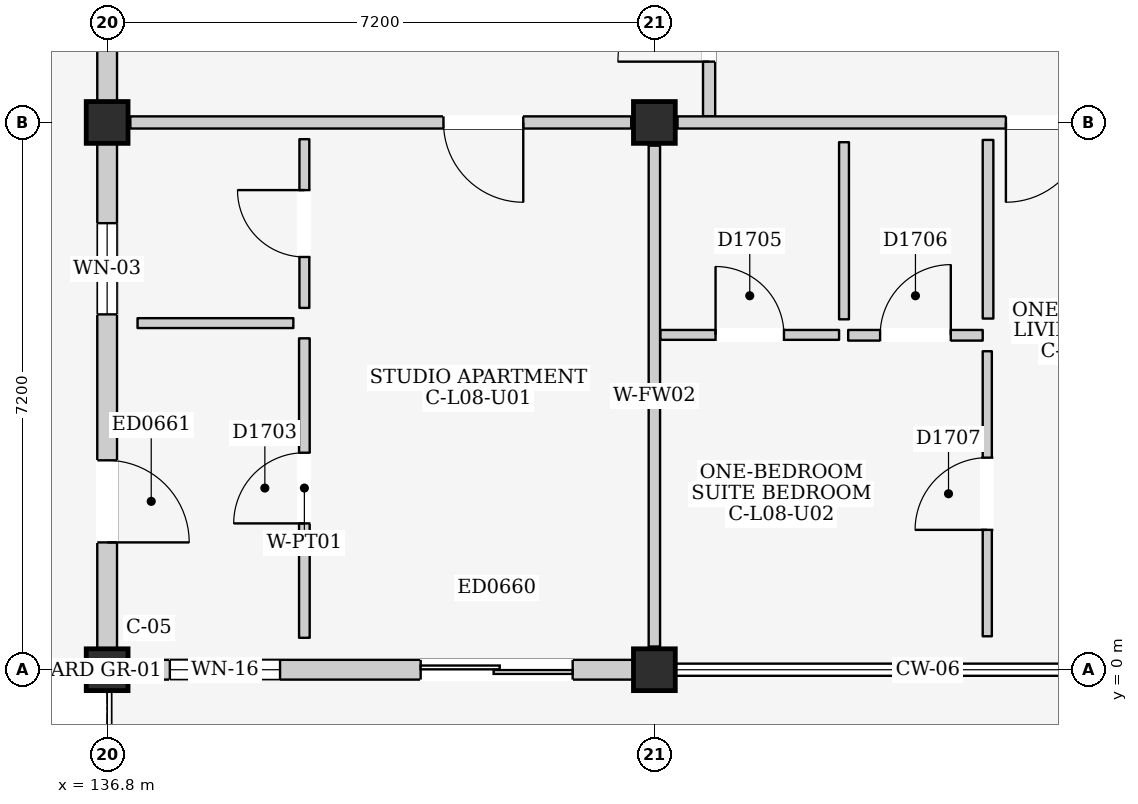
"""IFC4 building model, lengths in metres.
Left out: names, types, materials, properties, quantities, classifications, styles, units other than length and angle.
Written with IfcOpenShell. Run it as: python <this file> out.ifc"""

import sys

from ifc_helpers import new_model, si_unit, direction, frame, frame_2d, origin, origin_2d, place, context, subcontext, project, spatial, rectangle, extrude, element, fill, save


model = new_model("IFC4")
c1 = context("Model", 3, precision=1e-05, world=origin(), true_north=direction((0.0, 1.0)))
c2 = subcontext(c1, "Body", "Model", "MODEL_VIEW")
j1 = project(units=[si_unit("LENGTHUNIT", "METRE"), si_unit("PLANEANGLEUNIT", "RADIAN")], contexts=[c1])
p1 = place(None, origin())
s1 = spatial("IfcSite", under=j1, at=p1, CompositionType="ELEMENT")
p2 = place(p1, origin())
s2 = spatial("IfcBuilding", under=s1, at=p2, CompositionType="ELEMENT")
p3 = place(p2, frame((0.0, 0.0, 28.3)))
s3 = spatial("IfcBuildingStorey", under=s2, at=p3, CompositionType="ELEMENT", Elevation=28.3)
for number, where, z_axis, x_axis in (
    (1, (136.8, 0.0, 0.0), (0.0, 0.0, 1.0), (1.0, 0.0, 0.0)),
    (2, (136.8, 7.2, 0.0), (0.0, 0.0, 1.0), (1.0, 0.0, 0.0)),
    (3, (144.0, 0.0, 0.0), (0.0, 0.0, 1.0), (1.0, 0.0, 0.0)),
    (4, (144.0, 7.2, 0.0), (0.0, 0.0, 1.0), (1.0, 0.0, 0.0)),
):
    element("IfcColumn", number, at=place(p3, frame(where, z_axis=z_axis, x_axis=x_axis)), inside=s3, PredefinedType="COLUMN", context=c2, shape_type="SweptSolid", body=[
        extrude(rectangle(XDim=0.55, YDim=0.55, at=origin_2d()), origin(), (0.0, 0.0, 1.0), 3.2),
    ])
p4 = place(p3, frame((137.075, 0.0, 0.0), z_axis=(0.0, 0.0, 1.0), x_axis=(1.0, 0.0, 0.0)))
e5 = element("IfcWall", 5, at=p4, inside=s3, PredefinedType="ELEMENTEDWALL", context=c2, shape_type="SweptSolid", body=[
    extrude(rectangle(XDim=6.65, YDim=0.26, at=frame_2d((3.325, 0.0))), origin(), (0.0, 0.0, 1.0), 2.485),
])
p5 = place(p4, frame((3.85, 0.0, 0.0)))
e6 = element("IfcOpeningElement", 6, at=p5, cuts=e5, PredefinedType="OPENING", context=c2, shape_type="SweptSolid", body=[
    extrude(rectangle(XDim=2.0, YDim=2.12, at=frame_2d((1.0, 1.06))), frame((0.0, 0.145, 0.0), z_axis=(0.0, -1.0, 0.0), x_axis=(1.0, 0.0, 0.0)), (0.0, 0.0, 1.0), 0.29),
])
p6 = place(p4, frame((0.55, 0.0, 0.9)))
e7 = element("IfcOpeningElement", 7, at=p6, cuts=e5, PredefinedType="OPENING", context=c2, shape_type="SweptSolid", body=[
    extrude(rectangle(XDim=1.45, YDim=1.4, at=frame_2d((0.725, 0.7))), frame((0.0, 0.145, 0.0), z_axis=(0.0, -1.0, 0.0), x_axis=(1.0, 0.0, 0.0)), (0.0, 0.0, 1.0), 0.29),
])
p7 = place(p3, frame((136.8, 0.275, 0.0), z_axis=(0.0, 0.0, 1.0), x_axis=(0.0, 1.0, 0.0)))
e8 = element("IfcWall", 8, at=p7, inside=s3, PredefinedType="ELEMENTEDWALL", context=c2, shape_type="SweptSolid", body=[
    extrude(rectangle(XDim=6.65, YDim=0.26, at=frame_2d((3.325, 0.0))), origin(), (0.0, 0.0, 1.0), 2.435),
])
p8 = place(p7, frame((1.4, 0.0, 0.0)))
e9 = element("IfcOpeningElement", 9, at=p8, cuts=e8, PredefinedType="OPENING", context=c2, shape_type="SweptSolid", body=[
    extrude(rectangle(XDim=1.08, YDim=2.12, at=frame_2d((0.54, 1.06))), frame((0.0, 0.145, 0.0), z_axis=(0.0, -1.0, 0.0), x_axis=(1.0, 0.0, 0.0)), (0.0, 0.0, 1.0), 0.29),
])
p9 = place(p7, frame((4.4, 0.0, 0.95)))
e10 = element("IfcOpeningElement", 10, at=p9, cuts=e8, PredefinedType="OPENING", context=c2, shape_type="SweptSolid", body=[
    extrude(rectangle(XDim=1.2, YDim=1.35, at=frame_2d((0.6, 0.675))), frame((0.0, 0.145, 0.0), z_axis=(0.0, -1.0, 0.0), x_axis=(1.0, 0.0, 0.0)), (0.0, 0.0, 1.0), 0.29),
])
p10 = place(p3, frame((136.8, 7.475, 0.0), z_axis=(0.0, 0.0, 1.0), x_axis=(0.0, 1.0, 0.0)))
e11 = element("IfcWall", 11, at=p10, inside=s3, PredefinedType="ELEMENTEDWALL", context=c2, shape_type="SweptSolid", body=[
    extrude(rectangle(XDim=6.65, YDim=0.26, at=frame_2d((3.325, 0.0))), origin(), (0.0, 0.0, 1.0), 2.435),
])
p11 = place(p10, frame((4.2, 0.0, 1.2)))
e12 = element("IfcOpeningElement", 12, at=p11, cuts=e11, PredefinedType="OPENING", context=c2, shape_type="SweptSolid", body=[
    extrude(rectangle(XDim=1.0, YDim=0.9, at=frame_2d((0.5, 0.45))), frame((0.0, 0.145, 0.0), z_axis=(0.0, -1.0, 0.0), x_axis=(1.0, 0.0, 0.0)), (0.0, 0.0, 1.0), 0.29),
])
p12 = place(p3, frame((144.72, 7.28, 0.0), z_axis=(0.0, 0.0, 1.0), x_axis=(0.0, 1.0, 0.0)))
e13 = element("IfcWall", 13, at=p12, inside=s3, PredefinedType="PARTITIONING", context=c2, shape_type="SweptSolid", body=[
    extrude(rectangle(XDim=4.32, YDim=0.16, at=frame_2d((2.16, 0.0))), origin(), (0.0, 0.0, 1.0), 2.95),
])
p13 = place(p12, frame((0.72, 0.0, 0.0)))
e14 = element("IfcOpeningElement", 14, at=p13, cuts=e13, PredefinedType="OPENING", context=c2, shape_type="SweptSolid", body=[
    extrude(rectangle(XDim=1.2, YDim=2.2, at=frame_2d((0.6, 1.1))), frame((0.0, 0.095, 0.0), z_axis=(0.0, -1.0, 0.0), x_axis=(1.0, 0.0, 0.0)), (0.0, 0.0, 1.0), 0.19),
])
p14 = place(p3, frame((137.105, 7.2, 0.0), z_axis=(0.0, 0.0, 1.0), x_axis=(1.0, 0.0, 0.0)))
e15 = element("IfcWall", 15, at=p14, inside=s3, PredefinedType="PARTITIONING", context=c2, shape_type="SweptSolid", body=[
    extrude(rectangle(XDim=6.59, YDim=0.16, at=frame_2d((3.295, 0.0))), origin(), (0.0, 0.0, 1.0), 2.335),
])
p15 = place(p14, frame((4.12, 0.0, 0.0)))
e16 = element("IfcOpeningElement", 16, at=p15, cuts=e15, PredefinedType="OPENING", context=c2, shape_type="SweptSolid", body=[
    extrude(rectangle(XDim=1.05, YDim=2.15, at=frame_2d((0.525, 1.075))), frame((0.0, 0.095, 0.0), z_axis=(0.0, -1.0, 0.0), x_axis=(1.0, 0.0, 0.0)), (0.0, 0.0, 1.0), 0.19),
])
p16 = place(p3, frame((144.0, 0.305, 0.0), z_axis=(0.0, 0.0, 1.0), x_axis=(0.0, 1.0, 0.0)))
e17 = element("IfcWall", 17, at=p16, inside=s3, PredefinedType="PARTITIONING", context=c2, shape_type="SweptSolid", body=[
    extrude(rectangle(XDim=6.59, YDim=0.15, at=frame_2d((3.295, 0.0))), origin(), (0.0, 0.0, 1.0), 2.435),
])
p17 = place(p3, frame((137.2, 4.56, 0.0), z_axis=(0.0, 0.0, 1.0), x_axis=(1.0, 0.0, 0.0)))
e18 = element("IfcWall", 18, at=p17, inside=s3, PredefinedType="PARTITIONING", context=c2, shape_type="SweptSolid", body=[
    extrude(rectangle(XDim=2.05, YDim=0.13, at=frame_2d((1.025, 0.0))), origin(), (0.0, 0.0, 1.0), 2.95),
])
p18 = place(p3, frame((139.395, 4.76, 0.0), z_axis=(0.0, 0.0, 1.0), x_axis=(0.0, 1.0, 0.0)))
e19 = element("IfcWall", 19, at=p18, inside=s3, PredefinedType="PARTITIONING", context=c2, shape_type="SweptSolid", body=[
    extrude(rectangle(XDim=2.22, YDim=0.13, at=frame_2d((1.11, 0.0))), origin(), (0.0, 0.0, 1.0), 2.95),
])
p19 = place(p18, frame((0.67, 0.0, 0.0)))
e20 = element("IfcOpeningElement", 20, at=p19, cuts=e19, PredefinedType="OPENING", context=c2, shape_type="SweptSolid", body=[
    extrude(rectangle(XDim=0.88, YDim=2.1, at=frame_2d((0.44, 1.05))), frame((0.0, 0.08, 0.0), z_axis=(0.0, -1.0, 0.0), x_axis=(1.0, 0.0, 0.0)), (0.0, 0.0, 1.0), 0.16),
])
p20 = place(p3, frame((139.395, 0.42, 0.0), z_axis=(0.0, 0.0, 1.0), x_axis=(0.0, 1.0, 0.0)))
e21 = element("IfcWall", 21, at=p20, inside=s3, PredefinedType="PARTITIONING", context=c2, shape_type="SweptSolid", body=[
    extrude(rectangle(XDim=3.94, YDim=0.14, at=frame_2d((1.97, 0.0))), origin(), (0.0, 0.0, 1.0), 2.95),
])
p21 = place(p20, frame((1.505, 0.0, 0.0)))
e22 = element("IfcOpeningElement", 22, at=p21, cuts=e21, PredefinedType="OPENING", context=c2, shape_type="SweptSolid", body=[
    extrude(rectangle(XDim=0.93, YDim=2.14, at=frame_2d((0.465, 1.07))), frame((0.0, 0.085, 0.0), z_axis=(0.0, -1.0, 0.0), x_axis=(1.0, 0.0, 0.0)), (0.0, 0.0, 1.0), 0.17),
])
p22 = place(p3, frame((144.305, 7.2, 0.0), z_axis=(0.0, 0.0, 1.0), x_axis=(1.0, 0.0, 0.0)))
e23 = element("IfcWall", 23, at=p22, inside=s3, PredefinedType="PARTITIONING", context=c2, shape_type="SweptSolid", body=[
    extrude(rectangle(XDim=6.59, YDim=0.16, at=frame_2d((3.295, 0.0))), origin(), (0.0, 0.0, 1.0), 2.335),
])
p23 = place(p22, frame((4.32, 0.0, 0.0)))
e24 = element("IfcOpeningElement", 24, at=p23, cuts=e23, PredefinedType="OPENING", context=c2, shape_type="SweptSolid", body=[
    extrude(rectangle(XDim=1.05, YDim=2.15, at=frame_2d((0.525, 1.075))), frame((0.0, 0.095, 0.0), z_axis=(0.0, -1.0, 0.0), x_axis=(1.0, 0.0, 0.0)), (0.0, 0.0, 1.0), 0.19),
])
p24 = place(p3, frame((144.08, 4.405, 0.0), z_axis=(0.0, 0.0, 1.0), x_axis=(1.0, 0.0, 0.0)))
e25 = element("IfcWall", 25, at=p24, inside=s3, PredefinedType="PARTITIONING", context=c2, shape_type="SweptSolid", body=[
    extrude(rectangle(XDim=2.35, YDim=0.13, at=frame_2d((1.175, 0.0))), origin(), (0.0, 0.0, 1.0), 2.95),
])
p25 = place(p24, frame((0.725, 0.0, 0.0)))
e26 = element("IfcOpeningElement", 26, at=p25, cuts=e25, PredefinedType="OPENING", context=c2, shape_type="SweptSolid", body=[
    extrude(rectangle(XDim=0.9, YDim=2.1, at=frame_2d((0.45, 1.05))), frame((0.0, 0.08, 0.0), z_axis=(0.0, -1.0, 0.0), x_axis=(1.0, 0.0, 0.0)), (0.0, 0.0, 1.0), 0.16),
])
p26 = place(p3, frame((146.495, 4.61, 0.0), z_axis=(0.0, 0.0, 1.0), x_axis=(0.0, 1.0, 0.0)))
e27 = element("IfcWall", 27, at=p26, inside=s3, PredefinedType="PARTITIONING", context=c2, shape_type="SweptSolid", body=[
    extrude(rectangle(XDim=2.33, YDim=0.13, at=frame_2d((1.165, 0.0))), origin(), (0.0, 0.0, 1.0), 2.95),
])
p27 = place(p3, frame((146.55, 4.4, 0.0), z_axis=(0.0, 0.0, 1.0), x_axis=(1.0, 0.0, 0.0)))
e28 = element("IfcWall", 28, at=p27, inside=s3, PredefinedType="PARTITIONING", context=c2, shape_type="SweptSolid", body=[
    extrude(rectangle(XDim=1.77, YDim=0.14, at=frame_2d((0.885, 0.0))), origin(), (0.0, 0.0, 1.0), 2.95),
])
p28 = place(p27, frame((0.42, 0.0, 0.0)))
e29 = element("IfcOpeningElement", 29, at=p28, cuts=e28, PredefinedType="OPENING", context=c2, shape_type="SweptSolid", body=[
    extrude(rectangle(XDim=0.93, YDim=2.14, at=frame_2d((0.465, 1.07))), frame((0.0, 0.085, 0.0), z_axis=(0.0, -1.0, 0.0), x_axis=(1.0, 0.0, 0.0)), (0.0, 0.0, 1.0), 0.17),
])
p29 = place(p3, frame((148.39, 4.62, 0.0), z_axis=(0.0, 0.0, 1.0), x_axis=(0.0, 1.0, 0.0)))
e30 = element("IfcWall", 30, at=p29, inside=s3, PredefinedType="PARTITIONING", context=c2, shape_type="SweptSolid", body=[
    extrude(rectangle(XDim=2.35, YDim=0.14, at=frame_2d((1.175, 0.0))), origin(), (0.0, 0.0, 1.0), 2.95),
])
p30 = place(p3, frame((148.38, 0.44, 0.0), z_axis=(0.0, 0.0, 1.0), x_axis=(0.0, 1.0, 0.0)))
e31 = element("IfcWall", 31, at=p30, inside=s3, PredefinedType="PARTITIONING", context=c2, shape_type="SweptSolid", body=[
    extrude(rectangle(XDim=3.75, YDim=0.12, at=frame_2d((1.875, 0.0))), origin(), (0.0, 0.0, 1.0), 2.95),
])
p31 = place(p30, frame((1.4, 0.0, 0.0)))
e32 = element("IfcOpeningElement", 32, at=p31, cuts=e31, PredefinedType="OPENING", context=c2, shape_type="SweptSolid", body=[
    extrude(rectangle(XDim=0.95, YDim=2.15, at=frame_2d((0.475, 1.075))), frame((0.0, 0.075, 0.0), z_axis=(0.0, -1.0, 0.0), x_axis=(1.0, 0.0, 0.0)), (0.0, 0.0, 1.0), 0.15),
])
p32 = place(p5, frame((2.0, 0.0, 0.0), z_axis=(0.0, 0.0, 1.0), x_axis=(-1.0, 0.0, 0.0)))
e33 = element("IfcDoor", 33, at=p32, inside=s3, OperationType="DOUBLE_DOOR_SLIDING", PredefinedType="DOOR", context=c2, shape_type="SweptSolid", body=[
    extrude(rectangle(XDim=2.0, YDim=2.12, at=frame_2d((1.0, 1.06))), frame((0.0, 0.025, 0.0), z_axis=(0.0, -1.0, 0.0), x_axis=(1.0, 0.0, 0.0)), (0.0, 0.0, 1.0), 0.05),
])
fill(e6, e33)
p33 = place(p6, origin())
e34 = element("IfcWindow", 34, at=p33, inside=s3, PartitioningType="DOUBLE_PANEL_VERTICAL", PredefinedType="WINDOW", context=c2, shape_type="SweptSolid", body=[
    extrude(rectangle(XDim=1.45, YDim=1.4, at=frame_2d((0.725, 0.7))), frame((0.0, 0.03, 0.0), z_axis=(0.0, -1.0, 0.0), x_axis=(1.0, 0.0, 0.0)), (0.0, 0.0, 1.0), 0.06),
])
fill(e7, e34)
p34 = place(p8, frame((1.08, 0.0, 0.0), z_axis=(0.0, 0.0, 1.0), x_axis=(-1.0, 0.0, 0.0)))
e35 = element("IfcDoor", 35, at=p34, inside=s3, OperationType="SINGLE_SWING_RIGHT", PredefinedType="DOOR", context=c2, shape_type="SweptSolid", body=[
    extrude(rectangle(XDim=1.08, YDim=2.12, at=frame_2d((0.54, 1.06))), frame((0.0, 0.025, 0.0), z_axis=(0.0, -1.0, 0.0), x_axis=(1.0, 0.0, 0.0)), (0.0, 0.0, 1.0), 0.05),
])
fill(e9, e35)
p35 = place(p9, origin())
e36 = element("IfcWindow", 36, at=p35, inside=s3, PartitioningType="SINGLE_PANEL", PredefinedType="WINDOW", context=c2, shape_type="SweptSolid", body=[
    extrude(rectangle(XDim=1.2, YDim=1.35, at=frame_2d((0.6, 0.675))), frame((0.0, 0.03, 0.0), z_axis=(0.0, -1.0, 0.0), x_axis=(1.0, 0.0, 0.0)), (0.0, 0.0, 1.0), 0.06),
])
fill(e10, e36)
p36 = place(p13, origin())
e37 = element("IfcDoor", 37, at=p36, inside=s3, OperationType="SINGLE_SWING_LEFT", PredefinedType="DOOR", context=c2, shape_type="SweptSolid", body=[
    extrude(rectangle(XDim=1.2, YDim=2.2, at=frame_2d((0.6, 1.1))), frame((0.0, 0.025, 0.0), z_axis=(0.0, -1.0, 0.0), x_axis=(1.0, 0.0, 0.0)), (0.0, 0.0, 1.0), 0.05),
])
fill(e14, e37)
p37 = place(p15, frame((1.05, 0.0, 0.0), z_axis=(0.0, 0.0, 1.0), x_axis=(-1.0, 0.0, 0.0)))
e38 = element("IfcDoor", 38, at=p37, inside=s3, OperationType="SINGLE_SWING_LEFT", PredefinedType="DOOR", context=c2, shape_type="SweptSolid", body=[
    extrude(rectangle(XDim=1.05, YDim=2.15, at=frame_2d((0.525, 1.075))), frame((0.0, 0.025, 0.0), z_axis=(0.0, -1.0, 0.0), x_axis=(1.0, 0.0, 0.0)), (0.0, 0.0, 1.0), 0.05),
])
fill(e16, e38)
p38 = place(p19, origin())
e39 = element("IfcDoor", 39, at=p38, inside=s3, OperationType="SINGLE_SWING_RIGHT", PredefinedType="DOOR", context=c2, shape_type="SweptSolid", body=[
    extrude(rectangle(XDim=0.88, YDim=2.1, at=frame_2d((0.44, 1.05))), frame((0.0, 0.025, 0.0), z_axis=(0.0, -1.0, 0.0), x_axis=(1.0, 0.0, 0.0)), (0.0, 0.0, 1.0), 0.05),
])
fill(e20, e39)
p39 = place(p21, origin())
e40 = element("IfcDoor", 40, at=p39, inside=s3, OperationType="SINGLE_SWING_LEFT", PredefinedType="DOOR", context=c2, shape_type="SweptSolid", body=[
    extrude(rectangle(XDim=0.93, YDim=2.14, at=frame_2d((0.465, 1.07))), frame((0.0, 0.025, 0.0), z_axis=(0.0, -1.0, 0.0), x_axis=(1.0, 0.0, 0.0)), (0.0, 0.0, 1.0), 0.05),
])
fill(e22, e40)
p40 = place(p23, frame((1.05, 0.0, 0.0), z_axis=(0.0, 0.0, 1.0), x_axis=(-1.0, 0.0, 0.0)))
e41 = element("IfcDoor", 41, at=p40, inside=s3, OperationType="SINGLE_SWING_RIGHT", PredefinedType="DOOR", context=c2, shape_type="SweptSolid", body=[
    extrude(rectangle(XDim=1.05, YDim=2.15, at=frame_2d((0.525, 1.075))), frame((0.0, 0.025, 0.0), z_axis=(0.0, -1.0, 0.0), x_axis=(1.0, 0.0, 0.0)), (0.0, 0.0, 1.0), 0.05),
])
fill(e24, e41)
p41 = place(p25, origin())
e42 = element("IfcDoor", 42, at=p41, inside=s3, OperationType="SINGLE_SWING_LEFT", PredefinedType="DOOR", context=c2, shape_type="SweptSolid", body=[
    extrude(rectangle(XDim=0.9, YDim=2.1, at=frame_2d((0.45, 1.05))), frame((0.0, 0.025, 0.0), z_axis=(0.0, -1.0, 0.0), x_axis=(1.0, 0.0, 0.0)), (0.0, 0.0, 1.0), 0.05),
])
fill(e26, e42)
p42 = place(p28, origin())
e43 = element("IfcDoor", 43, at=p42, inside=s3, OperationType="SINGLE_SWING_RIGHT", PredefinedType="DOOR", context=c2, shape_type="SweptSolid", body=[
    extrude(rectangle(XDim=0.93, YDim=2.14, at=frame_2d((0.465, 1.07))), frame((0.0, 0.025, 0.0), z_axis=(0.0, -1.0, 0.0), x_axis=(1.0, 0.0, 0.0)), (0.0, 0.0, 1.0), 0.05),
])
fill(e29, e43)
p43 = place(p31, origin())
e44 = element("IfcDoor", 44, at=p43, inside=s3, OperationType="SINGLE_SWING_LEFT", PredefinedType="DOOR", context=c2, shape_type="SweptSolid", body=[
    extrude(rectangle(XDim=0.95, YDim=2.15, at=frame_2d((0.475, 1.075))), frame((0.0, 0.025, 0.0), z_axis=(0.0, -1.0, 0.0), x_axis=(1.0, 0.0, 0.0)), (0.0, 0.0, 1.0), 0.05),
])
fill(e32, e44)
save(model, sys.argv[1])
